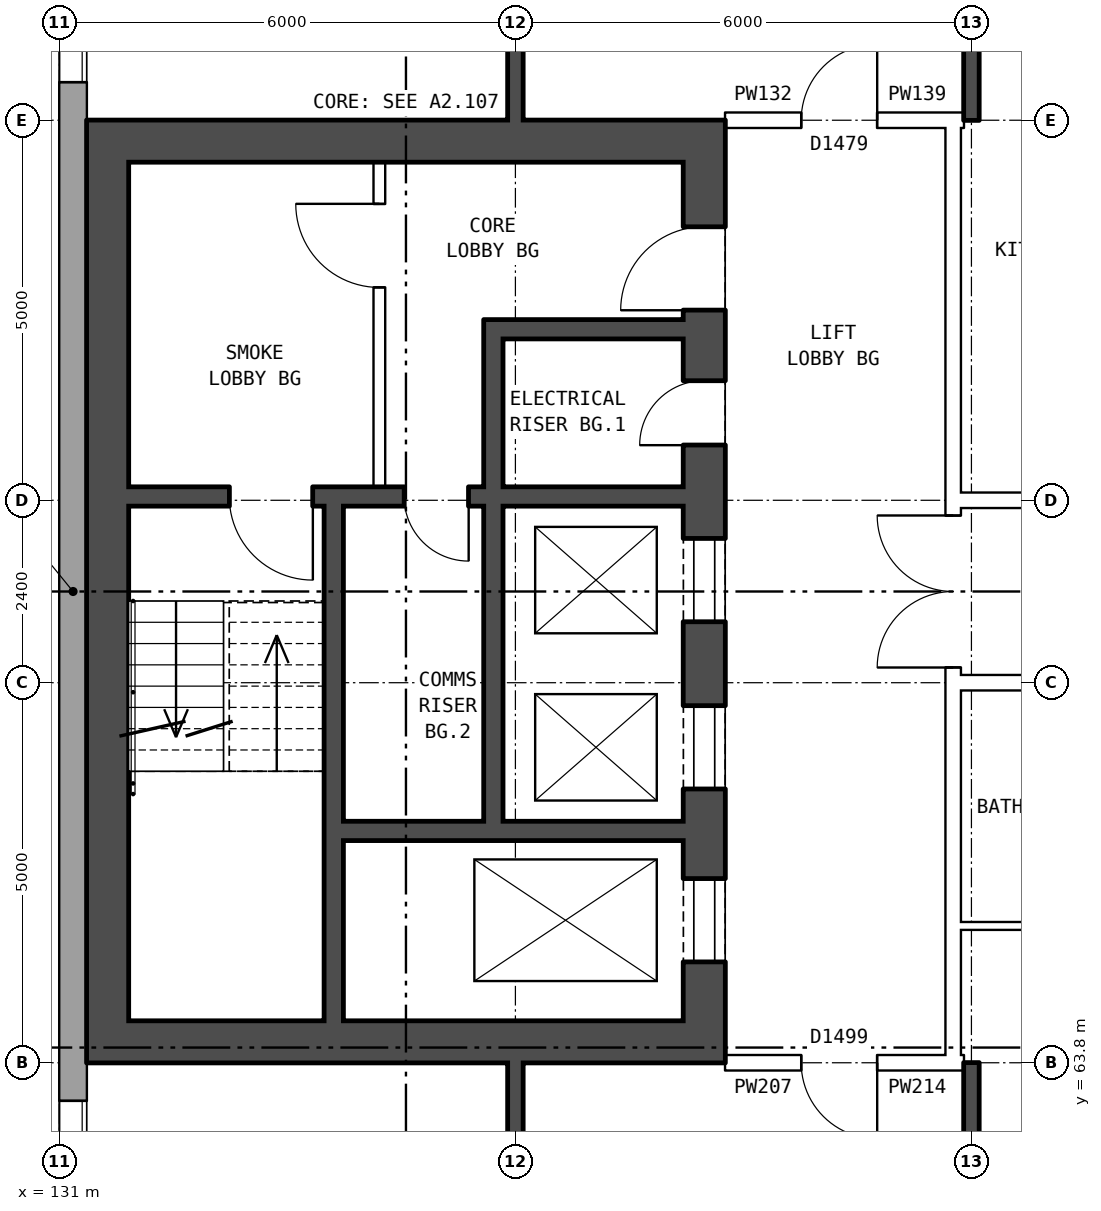
"""IFC4 building model, lengths in metres.
Left out: names, types, materials, properties, quantities, classifications, styles, units other than length and angle.
Written with IfcOpenShell. Run it as: python <this file> out.ifc"""

import sys

from ifc_helpers import new_model, si_unit, direction, frame, frame_2d, origin, place, context, subcontext, project, spatial, rectangle, extrude, element, fill, save


model = new_model("IFC4")
c1 = context("Model", 3, precision=1e-05, world=origin(), true_north=direction((0.0, 1.0)))
c2 = subcontext(c1, "Body", "Model", "MODEL_VIEW")
j1 = project(units=[si_unit("LENGTHUNIT", "METRE"), si_unit("PLANEANGLEUNIT", "RADIAN")], contexts=[c1])
p1 = place(None, origin())
s1 = spatial("IfcSite", under=j1, at=p1, CompositionType="ELEMENT")
p2 = place(p1, origin())
s2 = spatial("IfcBuilding", under=s1, at=p2, CompositionType="ELEMENT")
p3 = place(p2, frame((0.0, 0.0, 133.0)))
s3 = spatial("IfcBuildingStorey", under=s2, at=p3, CompositionType="ELEMENT", Elevation=133.0)
p4 = place(p3, frame((131.18, 82.925, 0.0), z_axis=(0.0, 0.0, 1.0), x_axis=(0.0, -1.0, 0.0)))
e1 = element("IfcWall", 1, at=p4, inside=s3, PredefinedType="STANDARD", context=c2, shape_type="SweptSolid", body=[
    extrude(rectangle(XDim=25.851, YDim=0.36, at=frame_2d((12.925, 0.0))), origin(), (0.0, 0.0, 1.0), 2.85),
])
p5 = place(p4, frame((1.625, 0.0, 0.8)))
e2 = element("IfcOpeningElement", 2, at=p5, cuts=e1, PredefinedType="OPENING", context=c2, shape_type="SweptSolid", body=[
    extrude(rectangle(XDim=1.6, YDim=1.8, at=frame_2d((0.8, 0.9))), frame((0.0, 0.19, 0.0), z_axis=(0.0, -1.0, 0.0), x_axis=(1.0, 0.0, 0.0)), (0.0, 0.0, 1.0), 0.38),
])
p6 = place(p4, frame((4.625, 0.0, 0.8)))
e3 = element("IfcOpeningElement", 3, at=p6, cuts=e1, PredefinedType="OPENING", context=c2, shape_type="SweptSolid", body=[
    extrude(rectangle(XDim=1.6, YDim=1.8, at=frame_2d((0.8, 0.9))), frame((0.0, 0.19, 0.0), z_axis=(0.0, -1.0, 0.0), x_axis=(1.0, 0.0, 0.0)), (0.0, 0.0, 1.0), 0.38),
])
p7 = place(p4, frame((19.625, 0.0, 0.8)))
e4 = element("IfcOpeningElement", 4, at=p7, cuts=e1, PredefinedType="OPENING", context=c2, shape_type="SweptSolid", body=[
    extrude(rectangle(XDim=1.6, YDim=1.8, at=frame_2d((0.8, 0.9))), frame((0.0, 0.19, 0.0), z_axis=(0.0, -1.0, 0.0), x_axis=(1.0, 0.0, 0.0)), (0.0, 0.0, 1.0), 0.38),
])
p8 = place(p4, frame((22.625, 0.0, 0.8)))
e5 = element("IfcOpeningElement", 5, at=p8, cuts=e1, PredefinedType="OPENING", context=c2, shape_type="SweptSolid", body=[
    extrude(rectangle(XDim=1.6, YDim=1.8, at=frame_2d((0.8, 0.9))), frame((0.0, 0.19, 0.0), z_axis=(0.0, -1.0, 0.0), x_axis=(1.0, 0.0, 0.0)), (0.0, 0.0, 1.0), 0.38),
])
p9 = place(p3, frame((139.485, 63.8, 0.0), z_axis=(0.0, 0.0, 1.0), x_axis=(0.0, 1.0, 0.0)))
e6 = element("IfcWall", 6, at=p9, inside=s3, PredefinedType="SHEAR", context=c2, shape_type="SweptSolid", body=[
    extrude(rectangle(XDim=12.4, YDim=0.55, at=frame_2d((6.2, 0.0))), origin(), (0.0, 0.0, 1.0), 2.85),
])
p10 = place(p9, frame((1.325, 0.0, 0.0)))
e7 = element("IfcOpeningElement", 7, at=p10, cuts=e6, PredefinedType="OPENING", context=c2, shape_type="SweptSolid", body=[
    extrude(rectangle(XDim=1.1, YDim=2.1, at=frame_2d((0.55, 1.05))), frame((0.0, 0.285, 0.0), z_axis=(0.0, -1.0, 0.0), x_axis=(1.0, 0.0, 0.0)), (0.0, 0.0, 1.0), 0.57),
])
p11 = place(p9, frame((3.6, 0.0, 0.0)))
e8 = element("IfcOpeningElement", 8, at=p11, cuts=e6, PredefinedType="OPENING", context=c2, shape_type="SweptSolid", body=[
    extrude(rectangle(XDim=1.1, YDim=2.1, at=frame_2d((0.55, 1.05))), frame((0.0, 0.285, 0.0), z_axis=(0.0, -1.0, 0.0), x_axis=(1.0, 0.0, 0.0)), (0.0, 0.0, 1.0), 0.57),
])
p12 = place(p9, frame((5.8, 0.0, 0.0)))
e9 = element("IfcOpeningElement", 9, at=p12, cuts=e6, PredefinedType="OPENING", context=c2, shape_type="SweptSolid", body=[
    extrude(rectangle(XDim=1.1, YDim=2.1, at=frame_2d((0.55, 1.05))), frame((0.0, 0.285, 0.0), z_axis=(0.0, -1.0, 0.0), x_axis=(1.0, 0.0, 0.0)), (0.0, 0.0, 1.0), 0.57),
])
p13 = place(p9, frame((9.9, 0.0, 0.0)))
e10 = element("IfcOpeningElement", 10, at=p13, cuts=e6, PredefinedType="OPENING", context=c2, shape_type="SweptSolid", body=[
    extrude(rectangle(XDim=1.1, YDim=2.1, at=frame_2d((0.55, 1.05))), frame((0.0, 0.285, 0.0), z_axis=(0.0, -1.0, 0.0), x_axis=(1.0, 0.0, 0.0)), (0.0, 0.0, 1.0), 0.57),
])
p14 = place(p9, frame((8.125, 0.0, 0.0)))
e11 = element("IfcOpeningElement", 11, at=p14, cuts=e6, PredefinedType="OPENING", context=c2, shape_type="SweptSolid", body=[
    extrude(rectangle(XDim=0.85, YDim=2.1, at=frame_2d((0.425, 1.05))), frame((0.0, 0.285, 0.0), z_axis=(0.0, -1.0, 0.0), x_axis=(1.0, 0.0, 0.0)), (0.0, 0.0, 1.0), 0.57),
])
p15 = place(p3, frame((131.635, 63.8, 0.0), z_axis=(0.0, 0.0, 1.0), x_axis=(0.0, 1.0, 0.0)))
e12 = element("IfcWall", 12, at=p15, inside=s3, PredefinedType="SHEAR", context=c2, shape_type="SweptSolid", body=[
    extrude(rectangle(XDim=12.4, YDim=0.55, at=frame_2d((6.2, 0.0))), origin(), (0.0, 0.0, 1.0), 2.85),
])
for number, where, z_axis, x_axis in (
    (13, (139.21, 64.075, 0.0), (0.0, 0.0, 1.0), (-1.0, 0.0, 0.0)),
    (14, (139.21, 75.925, 0.0), (0.0, 0.0, 1.0), (-1.0, 0.0, 0.0)),
):
    element("IfcWall", number, at=place(p3, frame(where, z_axis=z_axis, x_axis=x_axis)), inside=s3, PredefinedType="SHEAR", context=c2, shape_type="SweptSolid", body=[
        extrude(rectangle(XDim=7.3, YDim=0.55, at=frame_2d((3.65, 0.0))), origin(), (0.0, 0.0, 1.0), 2.85),
    ])
p16 = place(p3, frame((139.21, 66.85, 0.0), z_axis=(0.0, 0.0, 1.0), x_axis=(-1.0, 0.0, 0.0)))
e15 = element("IfcWall", 15, at=p16, inside=s3, PredefinedType="SHEAR", context=c2, shape_type="SweptSolid", body=[
    extrude(rectangle(XDim=4.475, YDim=0.25, at=frame_2d((2.237, 0.0))), origin(), (0.0, 0.0, 1.0), 2.85),
])
p17 = place(p3, frame((139.21, 71.25, 0.0), z_axis=(0.0, 0.0, 1.0), x_axis=(-1.0, 0.0, 0.0)))
e16 = element("IfcWall", 16, at=p17, inside=s3, PredefinedType="SHEAR", context=c2, shape_type="SweptSolid", body=[
    extrude(rectangle(XDim=7.3, YDim=0.25, at=frame_2d((3.65, 0.0))), origin(), (0.0, 0.0, 1.0), 2.85),
])
p18 = place(p17, frame((4.875, 0.0, 0.0)))
e17 = element("IfcOpeningElement", 17, at=p18, cuts=e16, PredefinedType="OPENING", context=c2, shape_type="SweptSolid", body=[
    extrude(rectangle(XDim=1.1, YDim=2.1, at=frame_2d((0.55, 1.05))), frame((0.0, 0.135, 0.0), z_axis=(0.0, -1.0, 0.0), x_axis=(1.0, 0.0, 0.0)), (0.0, 0.0, 1.0), 0.27),
])
p19 = place(p17, frame((2.825, 0.0, 0.0)))
e18 = element("IfcOpeningElement", 18, at=p19, cuts=e16, PredefinedType="OPENING", context=c2, shape_type="SweptSolid", body=[
    extrude(rectangle(XDim=0.85, YDim=2.1, at=frame_2d((0.425, 1.05))), frame((0.0, 0.135, 0.0), z_axis=(0.0, -1.0, 0.0), x_axis=(1.0, 0.0, 0.0)), (0.0, 0.0, 1.0), 0.27),
])
p20 = place(p3, frame((139.21, 73.45, 0.0), z_axis=(0.0, 0.0, 1.0), x_axis=(-1.0, 0.0, 0.0)))
e19 = element("IfcWall", 19, at=p20, inside=s3, PredefinedType="SHEAR", context=c2, shape_type="SweptSolid", body=[
    extrude(rectangle(XDim=2.375, YDim=0.25, at=frame_2d((1.188, 0.0))), origin(), (0.0, 0.0, 1.0), 2.85),
])
p21 = place(p3, frame((136.71, 66.975, 0.0), z_axis=(0.0, 0.0, 1.0), x_axis=(0.0, 1.0, 0.0)))
e20 = element("IfcWall", 20, at=p21, inside=s3, PredefinedType="SHEAR", context=c2, shape_type="SweptSolid", body=[
    extrude(rectangle(XDim=4.15, YDim=0.25, at=frame_2d((2.075, 0.0))), origin(), (0.0, 0.0, 1.0), 2.85),
])
p22 = place(p3, frame((136.71, 71.375, 0.0), z_axis=(0.0, 0.0, 1.0), x_axis=(0.0, 1.0, 0.0)))
e21 = element("IfcWall", 21, at=p22, inside=s3, PredefinedType="SHEAR", context=c2, shape_type="SweptSolid", body=[
    extrude(rectangle(XDim=2.2, YDim=0.25, at=frame_2d((1.1, 0.0))), origin(), (0.0, 0.0, 1.0), 2.85),
])
p23 = place(p3, frame((135.21, 71.375, 0.0), z_axis=(0.0, 0.0, 1.0), x_axis=(0.0, 1.0, 0.0)))
e22 = element("IfcWall", 22, at=p23, inside=s3, PredefinedType="PARTITIONING", context=c2, shape_type="SweptSolid", body=[
    extrude(rectangle(XDim=4.275, YDim=0.15, at=frame_2d((2.137, 0.0))), origin(), (0.0, 0.0, 1.0), 2.85),
])
p24 = place(p23, frame((2.625, 0.0, 0.0)))
e23 = element("IfcOpeningElement", 23, at=p24, cuts=e22, PredefinedType="OPENING", context=c2, shape_type="SweptSolid", body=[
    extrude(rectangle(XDim=1.1, YDim=2.1, at=frame_2d((0.55, 1.05))), frame((0.0, 0.085, 0.0), z_axis=(0.0, -1.0, 0.0), x_axis=(1.0, 0.0, 0.0)), (0.0, 0.0, 1.0), 0.17),
])
p25 = place(p3, frame((134.61, 64.35, 0.0), z_axis=(0.0, 0.0, 1.0), x_axis=(0.0, 1.0, 0.0)))
e24 = element("IfcWall", 24, at=p25, inside=s3, PredefinedType="SHEAR", context=c2, shape_type="SweptSolid", body=[
    extrude(rectangle(XDim=6.775, YDim=0.25, at=frame_2d((3.387, 0.0))), origin(), (0.0, 0.0, 1.0), 2.85),
])
p26 = place(p3, frame((142.76, 63.9, 0.0), z_axis=(0.0, 0.0, 1.0), x_axis=(0.0, 1.0, 0.0)))
e25 = element("IfcWall", 25, at=p26, inside=s3, PredefinedType="PARTITIONING", context=c2, shape_type="SweptSolid", body=[
    extrude(rectangle(XDim=12.2, YDim=0.2, at=frame_2d((6.1, 0.0))), origin(), (0.0, 0.0, 1.0), 2.85),
])
p27 = place(p26, frame((5.1, 0.0, 0.0)))
e26 = element("IfcOpeningElement", 26, at=p27, cuts=e25, PredefinedType="OPENING", context=c2, shape_type="SweptSolid", body=[
    extrude(rectangle(XDim=2.0, YDim=2.1, at=frame_2d((1.0, 1.05))), frame((0.0, 0.11, 0.0), z_axis=(0.0, -1.0, 0.0), x_axis=(1.0, 0.0, 0.0)), (0.0, 0.0, 1.0), 0.22),
])
p28 = place(p3, frame((139.76, 63.8, 0.0), z_axis=(0.0, 0.0, 1.0), x_axis=(1.0, 0.0, 0.0)))
e27 = element("IfcWall", 27, at=p28, inside=s3, PredefinedType="PARTITIONING", context=c2, shape_type="SweptSolid", body=[
    extrude(rectangle(XDim=3.0, YDim=0.2, at=frame_2d((1.5, 0.0))), origin(), (0.0, 0.0, 1.0), 2.85),
])
p29 = place(p28, frame((1.0, 0.0, 0.0)))
e28 = element("IfcOpeningElement", 28, at=p29, cuts=e27, PredefinedType="OPENING", context=c2, shape_type="SweptSolid", body=[
    extrude(rectangle(XDim=1.0, YDim=2.1, at=frame_2d((0.5, 1.05))), frame((0.0, 0.11, 0.0), z_axis=(0.0, -1.0, 0.0), x_axis=(1.0, 0.0, 0.0)), (0.0, 0.0, 1.0), 0.22),
])
p30 = place(p3, frame((142.76, 63.8, 0.0), z_axis=(0.0, 0.0, 1.0), x_axis=(1.0, 0.0, 0.0)))
e29 = element("IfcWall", 29, at=p30, inside=s3, PredefinedType="PARTITIONING", context=c2, shape_type="SweptSolid", body=[
    extrude(rectangle(XDim=0.14, YDim=0.2, at=frame_2d((0.07, 0.0))), origin(), (0.0, 0.0, 1.0), 2.85),
])
p31 = place(p3, frame((142.76, 65.6, 0.0), z_axis=(0.0, 0.0, 1.0), x_axis=(1.0, 0.0, 0.0)))
e30 = element("IfcWall", 30, at=p31, inside=s3, PredefinedType="PARTITIONING", context=c2, shape_type="SweptSolid", body=[
    extrude(rectangle(XDim=3.24, YDim=0.1, at=frame_2d((1.62, 0.0))), origin(), (0.0, 0.0, 1.0), 2.85),
])
p32 = place(p3, frame((142.76, 68.8, 0.0), z_axis=(0.0, 0.0, 1.0), x_axis=(1.0, 0.0, 0.0)))
e31 = element("IfcWall", 31, at=p32, inside=s3, PredefinedType="PARTITIONING", context=c2, shape_type="SweptSolid", body=[
    extrude(rectangle(XDim=14.48, YDim=0.2, at=frame_2d((7.24, 0.0))), origin(), (0.0, 0.0, 1.0), 2.85),
])
p33 = place(p32, frame((4.24, 0.0, 0.0)))
e32 = element("IfcOpeningElement", 32, at=p33, cuts=e31, PredefinedType="OPENING", context=c2, shape_type="SweptSolid", body=[
    extrude(rectangle(XDim=1.0, YDim=2.1, at=frame_2d((0.5, 1.05))), frame((0.0, 0.11, 0.0), z_axis=(0.0, -1.0, 0.0), x_axis=(1.0, 0.0, 0.0)), (0.0, 0.0, 1.0), 0.22),
])
p34 = place(p32, frame((10.24, 0.0, 0.0)))
e33 = element("IfcOpeningElement", 33, at=p34, cuts=e31, PredefinedType="OPENING", context=c2, shape_type="SweptSolid", body=[
    extrude(rectangle(XDim=1.0, YDim=2.1, at=frame_2d((0.5, 1.05))), frame((0.0, 0.11, 0.0), z_axis=(0.0, -1.0, 0.0), x_axis=(1.0, 0.0, 0.0)), (0.0, 0.0, 1.0), 0.22),
])
p35 = place(p3, frame((142.76, 71.2, 0.0), z_axis=(0.0, 0.0, 1.0), x_axis=(1.0, 0.0, 0.0)))
e34 = element("IfcWall", 34, at=p35, inside=s3, PredefinedType="PARTITIONING", context=c2, shape_type="SweptSolid", body=[
    extrude(rectangle(XDim=14.48, YDim=0.2, at=frame_2d((7.24, 0.0))), origin(), (0.0, 0.0, 1.0), 2.85),
])
p36 = place(p35, frame((1.12, 0.0, 0.0)))
e35 = element("IfcOpeningElement", 35, at=p36, cuts=e34, PredefinedType="OPENING", context=c2, shape_type="SweptSolid", body=[
    extrude(rectangle(XDim=1.0, YDim=2.1, at=frame_2d((0.5, 1.05))), frame((0.0, 0.11, 0.0), z_axis=(0.0, -1.0, 0.0), x_axis=(1.0, 0.0, 0.0)), (0.0, 0.0, 1.0), 0.22),
])
p37 = place(p35, frame((10.24, 0.0, 0.0)))
e36 = element("IfcOpeningElement", 36, at=p37, cuts=e34, PredefinedType="OPENING", context=c2, shape_type="SweptSolid", body=[
    extrude(rectangle(XDim=1.0, YDim=2.1, at=frame_2d((0.5, 1.05))), frame((0.0, 0.11, 0.0), z_axis=(0.0, -1.0, 0.0), x_axis=(1.0, 0.0, 0.0)), (0.0, 0.0, 1.0), 0.22),
])
p38 = place(p3, frame((139.76, 76.2, 0.0), z_axis=(0.0, 0.0, 1.0), x_axis=(1.0, 0.0, 0.0)))
e37 = element("IfcWall", 37, at=p38, inside=s3, PredefinedType="PARTITIONING", context=c2, shape_type="SweptSolid", body=[
    extrude(rectangle(XDim=3.0, YDim=0.2, at=frame_2d((1.5, 0.0))), origin(), (0.0, 0.0, 1.0), 2.85),
])
p39 = place(p38, frame((1.0, 0.0, 0.0)))
e38 = element("IfcOpeningElement", 38, at=p39, cuts=e37, PredefinedType="OPENING", context=c2, shape_type="SweptSolid", body=[
    extrude(rectangle(XDim=1.0, YDim=2.1, at=frame_2d((0.5, 1.05))), frame((0.0, 0.11, 0.0), z_axis=(0.0, -1.0, 0.0), x_axis=(1.0, 0.0, 0.0)), (0.0, 0.0, 1.0), 0.22),
])
p40 = place(p3, frame((142.76, 76.2, 0.0), z_axis=(0.0, 0.0, 1.0), x_axis=(1.0, 0.0, 0.0)))
e39 = element("IfcWall", 39, at=p40, inside=s3, PredefinedType="PARTITIONING", context=c2, shape_type="SweptSolid", body=[
    extrude(rectangle(XDim=0.14, YDim=0.2, at=frame_2d((0.07, 0.0))), origin(), (0.0, 0.0, 1.0), 2.85),
])
p41 = place(p3, frame((137.0, 54.36, 0.0), z_axis=(0.0, 0.0, 1.0), x_axis=(0.0, 1.0, 0.0)))
e40 = element("IfcWall", 40, at=p41, inside=s3, PredefinedType="SOLIDWALL", context=c2, shape_type="SweptSolid", body=[
    extrude(rectangle(XDim=9.44, YDim=0.2, at=frame_2d((4.72, 0.0))), origin(), (0.0, 0.0, 1.0), 2.85),
])
p42 = place(p41, frame((7.34, 0.0, 0.0)))
e41 = element("IfcOpeningElement", 41, at=p42, cuts=e40, PredefinedType="OPENING", context=c2, shape_type="SweptSolid", body=[
    extrude(rectangle(XDim=0.9, YDim=2.1, at=frame_2d((0.45, 1.05))), frame((0.0, 0.11, 0.0), z_axis=(0.0, -1.0, 0.0), x_axis=(1.0, 0.0, 0.0)), (0.0, 0.0, 1.0), 0.22),
])
p43 = place(p3, frame((137.0, 76.2, 0.0), z_axis=(0.0, 0.0, 1.0), x_axis=(0.0, 1.0, 0.0)))
e42 = element("IfcWall", 42, at=p43, inside=s3, PredefinedType="SOLIDWALL", context=c2, shape_type="SweptSolid", body=[
    extrude(rectangle(XDim=9.44, YDim=0.2, at=frame_2d((4.72, 0.0))), origin(), (0.0, 0.0, 1.0), 2.85),
])
p44 = place(p43, frame((1.35, 0.0, 0.0)))
e43 = element("IfcOpeningElement", 43, at=p44, cuts=e42, PredefinedType="OPENING", context=c2, shape_type="SweptSolid", body=[
    extrude(rectangle(XDim=0.9, YDim=2.1, at=frame_2d((0.45, 1.05))), frame((0.0, 0.11, 0.0), z_axis=(0.0, -1.0, 0.0), x_axis=(1.0, 0.0, 0.0)), (0.0, 0.0, 1.0), 0.22),
])
for number, where, z_axis, x_axis in (
    (44, (143.0, 54.36, 0.0), (0.0, 0.0, 1.0), (0.0, 1.0, 0.0)),
    (45, (143.0, 76.2, 0.0), (0.0, 0.0, 1.0), (0.0, 1.0, 0.0)),
):
    element("IfcWall", number, at=place(p3, frame(where, z_axis=z_axis, x_axis=x_axis)), inside=s3, PredefinedType="SOLIDWALL", context=c2, shape_type="SweptSolid", body=[
        extrude(rectangle(XDim=9.44, YDim=0.2, at=frame_2d((4.72, 0.0))), origin(), (0.0, 0.0, 1.0), 2.85),
    ])
p45 = place(p6, origin())
e46 = element("IfcWindow", 46, at=p45, inside=s3, PartitioningType="SINGLE_PANEL", PredefinedType="WINDOW", context=c2, shape_type="SweptSolid", body=[
    extrude(rectangle(XDim=1.6, YDim=1.8, at=frame_2d((0.8, 0.9))), frame((0.0, 0.15, 0.0), z_axis=(0.0, -1.0, 0.0), x_axis=(1.0, 0.0, 0.0)), (0.0, 0.0, 1.0), 0.06),
])
fill(e3, e46)
p46 = place(p7, origin())
e47 = element("IfcWindow", 47, at=p46, inside=s3, PartitioningType="SINGLE_PANEL", PredefinedType="WINDOW", context=c2, shape_type="SweptSolid", body=[
    extrude(rectangle(XDim=1.6, YDim=1.8, at=frame_2d((0.8, 0.9))), frame((0.0, 0.15, 0.0), z_axis=(0.0, -1.0, 0.0), x_axis=(1.0, 0.0, 0.0)), (0.0, 0.0, 1.0), 0.06),
])
fill(e4, e47)
p47 = place(p10, origin())
e48 = element("IfcDoor", 48, at=p47, inside=s3, OperationType="DOUBLE_DOOR_SLIDING", PredefinedType="DOOR", context=c2, shape_type="SweptSolid", body=[
    extrude(rectangle(XDim=1.1, YDim=2.1, at=frame_2d((0.55, 1.05))), frame((0.0, 0.26, 0.0), z_axis=(0.0, -1.0, 0.0), x_axis=(1.0, 0.0, 0.0)), (0.0, 0.0, 1.0), 0.05),
])
fill(e7, e48)
p48 = place(p11, origin())
e49 = element("IfcDoor", 49, at=p48, inside=s3, OperationType="DOUBLE_DOOR_SLIDING", PredefinedType="DOOR", context=c2, shape_type="SweptSolid", body=[
    extrude(rectangle(XDim=1.1, YDim=2.1, at=frame_2d((0.55, 1.05))), frame((0.0, 0.26, 0.0), z_axis=(0.0, -1.0, 0.0), x_axis=(1.0, 0.0, 0.0)), (0.0, 0.0, 1.0), 0.05),
])
fill(e8, e49)
p49 = place(p12, origin())
e50 = element("IfcDoor", 50, at=p49, inside=s3, OperationType="DOUBLE_DOOR_SLIDING", PredefinedType="DOOR", context=c2, shape_type="SweptSolid", body=[
    extrude(rectangle(XDim=1.1, YDim=2.1, at=frame_2d((0.55, 1.05))), frame((0.0, 0.26, 0.0), z_axis=(0.0, -1.0, 0.0), x_axis=(1.0, 0.0, 0.0)), (0.0, 0.0, 1.0), 0.05),
])
fill(e9, e50)
p50 = place(p13, origin())
e51 = element("IfcDoor", 51, at=p50, inside=s3, OperationType="SINGLE_SWING_LEFT", PredefinedType="DOOR", context=c2, shape_type="SweptSolid", body=[
    extrude(rectangle(XDim=1.1, YDim=2.1, at=frame_2d((0.55, 1.05))), frame((0.0, 0.26, 0.0), z_axis=(0.0, -1.0, 0.0), x_axis=(1.0, 0.0, 0.0)), (0.0, 0.0, 1.0), 0.05),
])
fill(e10, e51)
p51 = place(p24, origin())
e52 = element("IfcDoor", 52, at=p51, inside=s3, OperationType="SINGLE_SWING_RIGHT", PredefinedType="DOOR", context=c2, shape_type="SweptSolid", body=[
    extrude(rectangle(XDim=1.1, YDim=2.1, at=frame_2d((0.55, 1.05))), frame((0.0, 0.025, 0.0), z_axis=(0.0, -1.0, 0.0), x_axis=(1.0, 0.0, 0.0)), (0.0, 0.0, 1.0), 0.05),
])
fill(e23, e52)
p52 = place(p18, origin())
e53 = element("IfcDoor", 53, at=p52, inside=s3, OperationType="SINGLE_SWING_LEFT", PredefinedType="DOOR", context=c2, shape_type="SweptSolid", body=[
    extrude(rectangle(XDim=1.1, YDim=2.1, at=frame_2d((0.55, 1.05))), frame((0.0, 0.025, 0.0), z_axis=(0.0, -1.0, 0.0), x_axis=(1.0, 0.0, 0.0)), (0.0, 0.0, 1.0), 0.05),
])
fill(e17, e53)
p53 = place(p14, origin())
e54 = element("IfcDoor", 54, at=p53, inside=s3, OperationType="SINGLE_SWING_LEFT", PredefinedType="DOOR", context=c2, shape_type="SweptSolid", body=[
    extrude(rectangle(XDim=0.85, YDim=2.1, at=frame_2d((0.425, 1.05))), frame((0.0, 0.26, 0.0), z_axis=(0.0, -1.0, 0.0), x_axis=(1.0, 0.0, 0.0)), (0.0, 0.0, 1.0), 0.05),
])
fill(e11, e54)
p54 = place(p19, origin())
e55 = element("IfcDoor", 55, at=p54, inside=s3, OperationType="SINGLE_SWING_LEFT", PredefinedType="DOOR", context=c2, shape_type="SweptSolid", body=[
    extrude(rectangle(XDim=0.85, YDim=2.1, at=frame_2d((0.425, 1.05))), frame((0.0, 0.025, 0.0), z_axis=(0.0, -1.0, 0.0), x_axis=(1.0, 0.0, 0.0)), (0.0, 0.0, 1.0), 0.05),
])
fill(e18, e55)
p55 = place(p27, origin())
e56 = element("IfcDoor", 56, at=p55, inside=s3, OperationType="DOUBLE_DOOR_SINGLE_SWING", PredefinedType="DOOR", context=c2, shape_type="SweptSolid", body=[
    extrude(rectangle(XDim=2.0, YDim=2.1, at=frame_2d((1.0, 1.05))), frame((0.0, 0.025, 0.0), z_axis=(0.0, -1.0, 0.0), x_axis=(1.0, 0.0, 0.0)), (0.0, 0.0, 1.0), 0.05),
])
fill(e26, e56)
p56 = place(p29, frame((1.0, 0.0, 0.0), z_axis=(0.0, 0.0, 1.0), x_axis=(-1.0, 0.0, 0.0)))
e57 = element("IfcDoor", 57, at=p56, inside=s3, OperationType="SINGLE_SWING_LEFT", PredefinedType="DOOR", context=c2, shape_type="SweptSolid", body=[
    extrude(rectangle(XDim=1.0, YDim=2.1, at=frame_2d((0.5, 1.05))), frame((0.0, 0.025, 0.0), z_axis=(0.0, -1.0, 0.0), x_axis=(1.0, 0.0, 0.0)), (0.0, 0.0, 1.0), 0.05),
])
fill(e28, e57)
p57 = place(p39, origin())
e58 = element("IfcDoor", 58, at=p57, inside=s3, OperationType="SINGLE_SWING_RIGHT", PredefinedType="DOOR", context=c2, shape_type="SweptSolid", body=[
    extrude(rectangle(XDim=1.0, YDim=2.1, at=frame_2d((0.5, 1.05))), frame((0.0, 0.025, 0.0), z_axis=(0.0, -1.0, 0.0), x_axis=(1.0, 0.0, 0.0)), (0.0, 0.0, 1.0), 0.05),
])
fill(e38, e58)
save(model, sys.argv[1])
